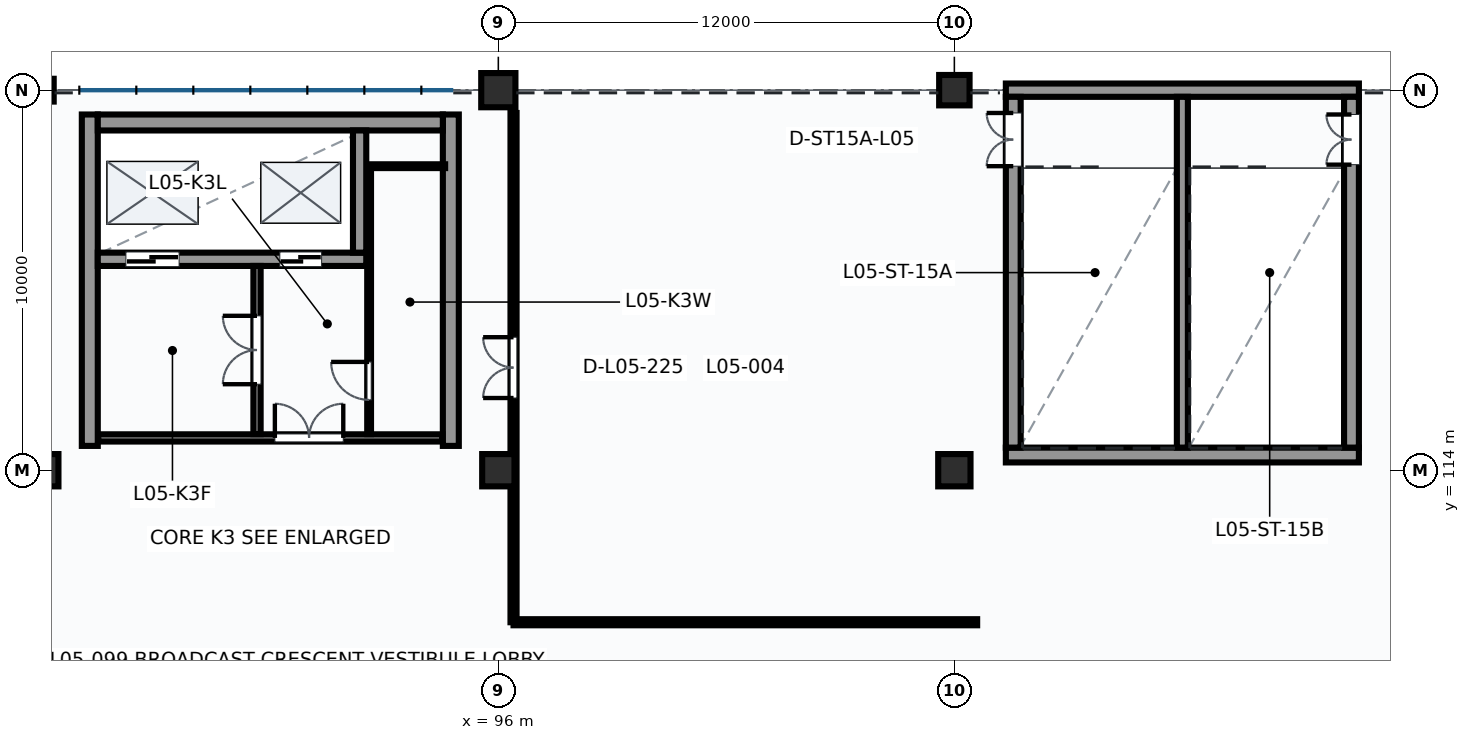
"""IFC4 building model, lengths in metres.
Left out: names, types, materials, properties, quantities, classifications, styles, units other than length and angle.
Written with IfcOpenShell. Run it as: python <this file> out.ifc"""

import sys

from ifc_helpers import new_model, si_unit, direction, frame, frame_2d, origin, origin_2d, place, context, subcontext, project, spatial, rectangle, circle, extrude, element, fill, save


model = new_model("IFC4")
c1 = context("Model", 3, precision=1e-05, world=origin(), true_north=direction((0.0, 1.0)))
c2 = subcontext(c1, "Body", "Model", "MODEL_VIEW")
j1 = project(units=[si_unit("LENGTHUNIT", "METRE"), si_unit("PLANEANGLEUNIT", "RADIAN")], contexts=[c1])
p1 = place(None, origin())
s1 = spatial("IfcSite", under=j1, at=p1, CompositionType="ELEMENT")
p2 = place(p1, origin())
s2 = spatial("IfcBuilding", under=s1, at=p2, CompositionType="ELEMENT")
p3 = place(p2, frame((0.0, 0.0, 24.6)))
s3 = spatial("IfcBuildingStorey", under=s2, at=p3, CompositionType="ELEMENT", Elevation=24.6)
p4 = place(p3, frame((84.0, 114.0, 0.0), z_axis=(0.0, 0.0, 1.0), x_axis=(1.0, 0.0, 0.0)))
e1 = element("IfcColumn", 1, at=p4, inside=s3, PredefinedType="COLUMN", context=c2, shape_type="SweptSolid", body=[
    extrude(rectangle(XDim=0.85, YDim=0.85, at=origin_2d()), origin(), (0.0, 0.0, 1.0), 4.8),
])
p5 = place(p3, frame((84.0, 124.0, 0.0), z_axis=(0.0, 0.0, 1.0), x_axis=(1.0, 0.0, 0.0)))
e2 = element("IfcColumn", 2, at=p5, inside=s3, PredefinedType="COLUMN", context=c2, shape_type="SweptSolid", body=[
    extrude(rectangle(XDim=0.6, YDim=0.6, at=origin_2d()), origin(), (0.0, 0.0, 1.0), 4.8),
])
p6 = place(p3, frame((96.0, 114.0, 0.0), z_axis=(0.0, 0.0, 1.0), x_axis=(1.0, 0.0, 0.0)))
e3 = element("IfcColumn", 3, at=p6, inside=s3, PredefinedType="COLUMN", context=c2, shape_type="SweptSolid", body=[
    extrude(rectangle(XDim=0.85, YDim=0.85, at=origin_2d()), origin(), (0.0, 0.0, 1.0), 4.8),
])
p7 = place(p3, frame((96.0, 124.0, 0.0), z_axis=(0.0, 0.0, 1.0), x_axis=(1.0, 0.0, 0.0)))
e4 = element("IfcColumn", 4, at=p7, inside=s3, PredefinedType="COLUMN", context=c2, shape_type="SweptSolid", body=[
    extrude(circle(Radius=0.45, at=origin_2d()), origin(), (0.0, 0.0, 1.0), 4.8),
])
p8 = place(p3, frame((108.0, 114.0, 0.0), z_axis=(0.0, 0.0, 1.0), x_axis=(1.0, 0.0, 0.0)))
e5 = element("IfcColumn", 5, at=p8, inside=s3, PredefinedType="COLUMN", context=c2, shape_type="SweptSolid", body=[
    extrude(rectangle(XDim=0.85, YDim=0.85, at=origin_2d()), origin(), (0.0, 0.0, 1.0), 4.8),
])
p9 = place(p3, frame((108.0, 124.0, 0.0), z_axis=(0.0, 0.0, 1.0), x_axis=(1.0, 0.0, 0.0)))
e6 = element("IfcColumn", 6, at=p9, inside=s3, PredefinedType="COLUMN", context=c2, shape_type="SweptSolid", body=[
    extrude(circle(Radius=0.4, at=origin_2d()), origin(), (0.0, 0.0, 1.0), 4.8),
])
p10 = place(p3, frame((109.355, 114.4, 0.0), z_axis=(0.0, 0.0, 1.0), x_axis=(1.0, 0.0, 0.0)))
e7 = element("IfcWall", 7, at=p10, inside=s3, PredefinedType="SHEAR", context=c2, shape_type="SweptSolid", body=[
    extrude(rectangle(XDim=9.29, YDim=0.39, at=frame_2d((4.645, 0.0))), origin(), (0.0, 0.0, 1.0), 3.9),
])
p11 = place(p3, frame((109.355, 124.0, 0.0), z_axis=(0.0, 0.0, 1.0), x_axis=(1.0, 0.0, 0.0)))
e8 = element("IfcWall", 8, at=p11, inside=s3, PredefinedType="SHEAR", context=c2, shape_type="SweptSolid", body=[
    extrude(rectangle(XDim=9.29, YDim=0.35, at=frame_2d((4.645, 0.0))), origin(), (0.0, 0.0, 1.0), 3.9),
])
p12 = place(p3, frame((109.55, 114.595, 0.0), z_axis=(0.0, 0.0, 1.0), x_axis=(0.0, 1.0, 0.0)))
e9 = element("IfcWall", 9, at=p12, inside=s3, PredefinedType="SHEAR", context=c2, shape_type="SweptSolid", body=[
    extrude(rectangle(XDim=9.23, YDim=0.39, at=frame_2d((4.615, 0.0))), origin(), (0.0, 0.0, 1.0), 3.9),
])
p13 = place(p12, frame((7.405, 0.0, 0.0)))
e10 = element("IfcOpeningElement", 10, at=p13, cuts=e9, PredefinedType="OPENING", context=c2, shape_type="SweptSolid", body=[
    extrude(rectangle(XDim=1.4, YDim=2.2, at=frame_2d((0.7, 1.1))), frame((0.0, 0.205, 0.0), z_axis=(0.0, -1.0, 0.0), x_axis=(1.0, 0.0, 0.0)), (0.0, 0.0, 1.0), 0.41),
])
p14 = place(p3, frame((118.45, 114.595, 0.0), z_axis=(0.0, 0.0, 1.0), x_axis=(0.0, 1.0, 0.0)))
e11 = element("IfcWall", 11, at=p14, inside=s3, PredefinedType="SHEAR", context=c2, shape_type="SweptSolid", body=[
    extrude(rectangle(XDim=9.23, YDim=0.39, at=frame_2d((4.615, 0.0))), origin(), (0.0, 0.0, 1.0), 3.9),
])
p15 = place(p14, frame((7.445, 0.0, 0.0)))
e12 = element("IfcOpeningElement", 12, at=p15, cuts=e11, PredefinedType="OPENING", context=c2, shape_type="SweptSolid", body=[
    extrude(rectangle(XDim=1.32, YDim=2.2, at=frame_2d((0.66, 1.1))), frame((0.0, 0.205, 0.0), z_axis=(0.0, -1.0, 0.0), x_axis=(1.0, 0.0, 0.0)), (0.0, 0.0, 1.0), 0.41),
])
p16 = place(p3, frame((114.0, 114.595, 0.0), z_axis=(0.0, 0.0, 1.0), x_axis=(0.0, 1.0, 0.0)))
e13 = element("IfcWall", 13, at=p16, inside=s3, PredefinedType="SHEAR", context=c2, shape_type="SweptSolid", body=[
    extrude(rectangle(XDim=9.23, YDim=0.29, at=frame_2d((4.615, 0.0))), origin(), (0.0, 0.0, 1.0), 3.9),
])
for number, where, z_axis, x_axis in (
    (14, (85.25, 114.64, 0.0), (0.0, 0.0, 1.0), (0.0, 1.0, 0.0)),
    (15, (94.75, 114.64, 0.0), (0.0, 0.0, 1.0), (0.0, 1.0, 0.0)),
):
    element("IfcWall", number, at=place(p3, frame(where, z_axis=z_axis, x_axis=x_axis)), inside=s3, PredefinedType="SHEAR", context=c2, shape_type="SweptSolid", body=[
        extrude(rectangle(XDim=8.72, YDim=0.42, at=frame_2d((4.36, 0.0))), origin(), (0.0, 0.0, 1.0), 4.8),
    ])
p17 = place(p3, frame((85.46, 123.15, 0.0), z_axis=(0.0, 0.0, 1.0), x_axis=(1.0, 0.0, 0.0)))
e16 = element("IfcWall", 16, at=p17, inside=s3, PredefinedType="SHEAR", context=c2, shape_type="SweptSolid", body=[
    extrude(rectangle(XDim=9.08, YDim=0.42, at=frame_2d((4.54, 0.0))), origin(), (0.0, 0.0, 1.0), 4.8),
])
p18 = place(p3, frame((85.46, 119.55, 0.0), z_axis=(0.0, 0.0, 1.0), x_axis=(1.0, 0.0, 0.0)))
e17 = element("IfcWall", 17, at=p18, inside=s3, PredefinedType="SHEAR", context=c2, shape_type="SweptSolid", body=[
    extrude(rectangle(XDim=7.065, YDim=0.35, at=frame_2d((3.532, 0.0))), origin(), (0.0, 0.0, 1.0), 4.8),
])
p19 = place(p18, frame((0.74, 0.0, 0.0)))
e18 = element("IfcOpeningElement", 18, at=p19, cuts=e17, PredefinedType="OPENING", context=c2, shape_type="SweptSolid", body=[
    extrude(rectangle(XDim=1.4, YDim=2.3, at=frame_2d((0.7, 1.15))), frame((0.0, 0.185, 0.0), z_axis=(0.0, -1.0, 0.0), x_axis=(1.0, 0.0, 0.0)), (0.0, 0.0, 1.0), 0.37),
])
p20 = place(p18, frame((4.79, 0.0, 0.0)))
e19 = element("IfcOpeningElement", 19, at=p20, cuts=e17, PredefinedType="OPENING", context=c2, shape_type="SweptSolid", body=[
    extrude(rectangle(XDim=1.1, YDim=2.2, at=frame_2d((0.55, 1.1))), frame((0.0, 0.185, 0.0), z_axis=(0.0, -1.0, 0.0), x_axis=(1.0, 0.0, 0.0)), (0.0, 0.0, 1.0), 0.37),
])
p21 = place(p3, frame((92.35, 119.725, 0.0), z_axis=(0.0, 0.0, 1.0), x_axis=(0.0, 1.0, 0.0)))
e20 = element("IfcWall", 20, at=p21, inside=s3, PredefinedType="SHEAR", context=c2, shape_type="SweptSolid", body=[
    extrude(rectangle(XDim=3.215, YDim=0.35, at=frame_2d((1.607, 0.0))), origin(), (0.0, 0.0, 1.0), 4.8),
])
p22 = place(p3, frame((85.47, 114.85, 0.0), z_axis=(0.0, 0.0, 1.0), x_axis=(1.0, 0.0, 0.0)))
e21 = element("IfcWall", 21, at=p22, inside=s3, PredefinedType="PARTITIONING", context=c2, shape_type="SweptSolid", body=[
    extrude(rectangle(XDim=9.06, YDim=0.19, at=frame_2d((4.53, 0.0))), origin(), (0.0, 0.0, 1.0), 4.58),
])
p23 = place(p22, frame((4.65, 0.0, 0.0)))
e22 = element("IfcOpeningElement", 22, at=p23, cuts=e21, PredefinedType="OPENING", context=c2, shape_type="SweptSolid", body=[
    extrude(rectangle(XDim=1.8, YDim=2.3, at=frame_2d((0.9, 1.15))), frame((0.0, 0.105, 0.0), z_axis=(0.0, -1.0, 0.0), x_axis=(1.0, 0.0, 0.0)), (0.0, 0.0, 1.0), 0.21),
])
p24 = place(p3, frame((89.65, 114.95, 0.0), z_axis=(0.0, 0.0, 1.0), x_axis=(0.0, 1.0, 0.0)))
e23 = element("IfcWall", 23, at=p24, inside=s3, PredefinedType="PARTITIONING", context=c2, shape_type="SweptSolid", body=[
    extrude(rectangle(XDim=4.425, YDim=0.19, at=frame_2d((2.212, 0.0))), origin(), (0.0, 0.0, 1.0), 4.58),
])
p25 = place(p24, frame((1.313, 0.0, 0.0)))
e24 = element("IfcOpeningElement", 24, at=p25, cuts=e23, PredefinedType="OPENING", context=c2, shape_type="SweptSolid", body=[
    extrude(rectangle(XDim=1.8, YDim=2.2, at=frame_2d((0.9, 1.1))), frame((0.0, 0.105, 0.0), z_axis=(0.0, -1.0, 0.0), x_axis=(1.0, 0.0, 0.0)), (0.0, 0.0, 1.0), 0.21),
])
p26 = place(p3, frame((92.6, 114.95, 0.0), z_axis=(0.0, 0.0, 1.0), x_axis=(0.0, 1.0, 0.0)))
e25 = element("IfcWall", 25, at=p26, inside=s3, PredefinedType="PARTITIONING", context=c2, shape_type="SweptSolid", body=[
    extrude(rectangle(XDim=7.05, YDim=0.1, at=frame_2d((3.525, 0.0))), origin(), (0.0, 0.0, 1.0), 4.58),
])
p27 = place(p26, frame((0.9, 0.0, 0.0)))
e26 = element("IfcOpeningElement", 26, at=p27, cuts=e25, PredefinedType="OPENING", context=c2, shape_type="SweptSolid", body=[
    extrude(rectangle(XDim=1.0, YDim=2.1, at=frame_2d((0.5, 1.05))), frame((0.0, 0.06, 0.0), z_axis=(0.0, -1.0, 0.0), x_axis=(1.0, 0.0, 0.0)), (0.0, 0.0, 1.0), 0.12),
])
p28 = place(p3, frame((92.6, 122.0, 0.0), z_axis=(0.0, 0.0, 1.0), x_axis=(1.0, 0.0, 0.0)))
e27 = element("IfcWall", 27, at=p28, inside=s3, PredefinedType="PARTITIONING", context=c2, shape_type="SweptSolid", body=[
    extrude(rectangle(XDim=2.0, YDim=0.1, at=frame_2d((1.0, 0.0))), origin(), (0.0, 0.0, 1.0), 4.58),
])
p29 = place(p3, frame((108.6, 110.0, 0.0), z_axis=(0.0, 0.0, 1.0), x_axis=(-1.0, 0.0, 0.0)))
e28 = element("IfcWall", 28, at=p29, inside=s3, PredefinedType="PARTITIONING", context=c2, shape_type="SweptSolid", body=[
    extrude(rectangle(XDim=12.2, YDim=0.16, at=frame_2d((6.1, 0.0))), origin(), (0.0, 0.0, 1.0), 4.58),
])
p30 = place(p3, frame((96.4, 110.0, 0.0), z_axis=(0.0, 0.0, 1.0), x_axis=(0.0, 1.0, 0.0)))
e29 = element("IfcWall", 29, at=p30, inside=s3, PredefinedType="PARTITIONING", context=c2, shape_type="SweptSolid", body=[
    extrude(rectangle(XDim=13.4, YDim=0.16, at=frame_2d((6.7, 0.0))), origin(), (0.0, 0.0, 1.0), 4.58),
])
p31 = place(p30, frame((5.9, 0.0, 0.0)))
e30 = element("IfcOpeningElement", 30, at=p31, cuts=e29, PredefinedType="OPENING", context=c2, shape_type="SweptSolid", body=[
    extrude(rectangle(XDim=1.6, YDim=2.2, at=frame_2d((0.8, 1.1))), frame((0.0, 0.09, 0.0), z_axis=(0.0, -1.0, 0.0), x_axis=(1.0, 0.0, 0.0)), (0.0, 0.0, 1.0), 0.18),
])
p32 = place(p13, frame((1.4, 0.0, 0.0), z_axis=(0.0, 0.0, 1.0), x_axis=(-1.0, 0.0, 0.0)))
e31 = element("IfcDoor", 31, at=p32, inside=s3, OperationType="DOUBLE_DOOR_SINGLE_SWING", PredefinedType="DOOR", context=c2, shape_type="SweptSolid", body=[
    extrude(rectangle(XDim=1.4, YDim=2.2, at=frame_2d((0.7, 1.1))), frame((0.0, 0.025, 0.0), z_axis=(0.0, -1.0, 0.0), x_axis=(1.0, 0.0, 0.0)), (0.0, 0.0, 1.0), 0.05),
])
fill(e10, e31)
p33 = place(p15, origin())
e32 = element("IfcDoor", 32, at=p33, inside=s3, OperationType="DOUBLE_DOOR_SINGLE_SWING", PredefinedType="DOOR", context=c2, shape_type="SweptSolid", body=[
    extrude(rectangle(XDim=1.32, YDim=2.2, at=frame_2d((0.66, 1.1))), frame((0.0, 0.025, 0.0), z_axis=(0.0, -1.0, 0.0), x_axis=(1.0, 0.0, 0.0)), (0.0, 0.0, 1.0), 0.05),
])
fill(e12, e32)
p34 = place(p19, origin())
e33 = element("IfcDoor", 33, at=p34, inside=s3, OperationType="SLIDING_TO_LEFT", PredefinedType="DOOR", context=c2, shape_type="SweptSolid", body=[
    extrude(rectangle(XDim=1.4, YDim=2.3, at=frame_2d((0.7, 1.15))), frame((0.0, 0.025, 0.0), z_axis=(0.0, -1.0, 0.0), x_axis=(1.0, 0.0, 0.0)), (0.0, 0.0, 1.0), 0.05),
])
fill(e18, e33)
p35 = place(p20, origin())
e34 = element("IfcDoor", 34, at=p35, inside=s3, OperationType="SLIDING_TO_LEFT", PredefinedType="DOOR", context=c2, shape_type="SweptSolid", body=[
    extrude(rectangle(XDim=1.1, YDim=2.2, at=frame_2d((0.55, 1.1))), frame((0.0, 0.025, 0.0), z_axis=(0.0, -1.0, 0.0), x_axis=(1.0, 0.0, 0.0)), (0.0, 0.0, 1.0), 0.05),
])
fill(e19, e34)
p36 = place(p23, origin())
e35 = element("IfcDoor", 35, at=p36, inside=s3, OperationType="DOUBLE_DOOR_SINGLE_SWING", PredefinedType="DOOR", context=c2, shape_type="SweptSolid", body=[
    extrude(rectangle(XDim=1.8, YDim=2.3, at=frame_2d((0.9, 1.15))), frame((0.0, 0.025, 0.0), z_axis=(0.0, -1.0, 0.0), x_axis=(1.0, 0.0, 0.0)), (0.0, 0.0, 1.0), 0.05),
])
fill(e22, e35)
p37 = place(p25, origin())
e36 = element("IfcDoor", 36, at=p37, inside=s3, OperationType="DOUBLE_DOOR_SINGLE_SWING", PredefinedType="DOOR", context=c2, shape_type="SweptSolid", body=[
    extrude(rectangle(XDim=1.8, YDim=2.2, at=frame_2d((0.9, 1.1))), frame((0.0, 0.025, 0.0), z_axis=(0.0, -1.0, 0.0), x_axis=(1.0, 0.0, 0.0)), (0.0, 0.0, 1.0), 0.05),
])
fill(e24, e36)
p38 = place(p27, origin())
e37 = element("IfcDoor", 37, at=p38, inside=s3, OperationType="SINGLE_SWING_RIGHT", PredefinedType="DOOR", context=c2, shape_type="SweptSolid", body=[
    extrude(rectangle(XDim=1.0, YDim=2.1, at=frame_2d((0.5, 1.05))), frame((0.0, 0.025, 0.0), z_axis=(0.0, -1.0, 0.0), x_axis=(1.0, 0.0, 0.0)), (0.0, 0.0, 1.0), 0.05),
])
fill(e26, e37)
p39 = place(p31, origin())
e38 = element("IfcDoor", 38, at=p39, inside=s3, OperationType="DOUBLE_DOOR_SINGLE_SWING", PredefinedType="DOOR", context=c2, shape_type="SweptSolid", body=[
    extrude(rectangle(XDim=1.6, YDim=2.2, at=frame_2d((0.8, 1.1))), frame((0.0, 0.025, 0.0), z_axis=(0.0, -1.0, 0.0), x_axis=(1.0, 0.0, 0.0)), (0.0, 0.0, 1.0), 0.05),
])
fill(e30, e38)
save(model, sys.argv[1])
